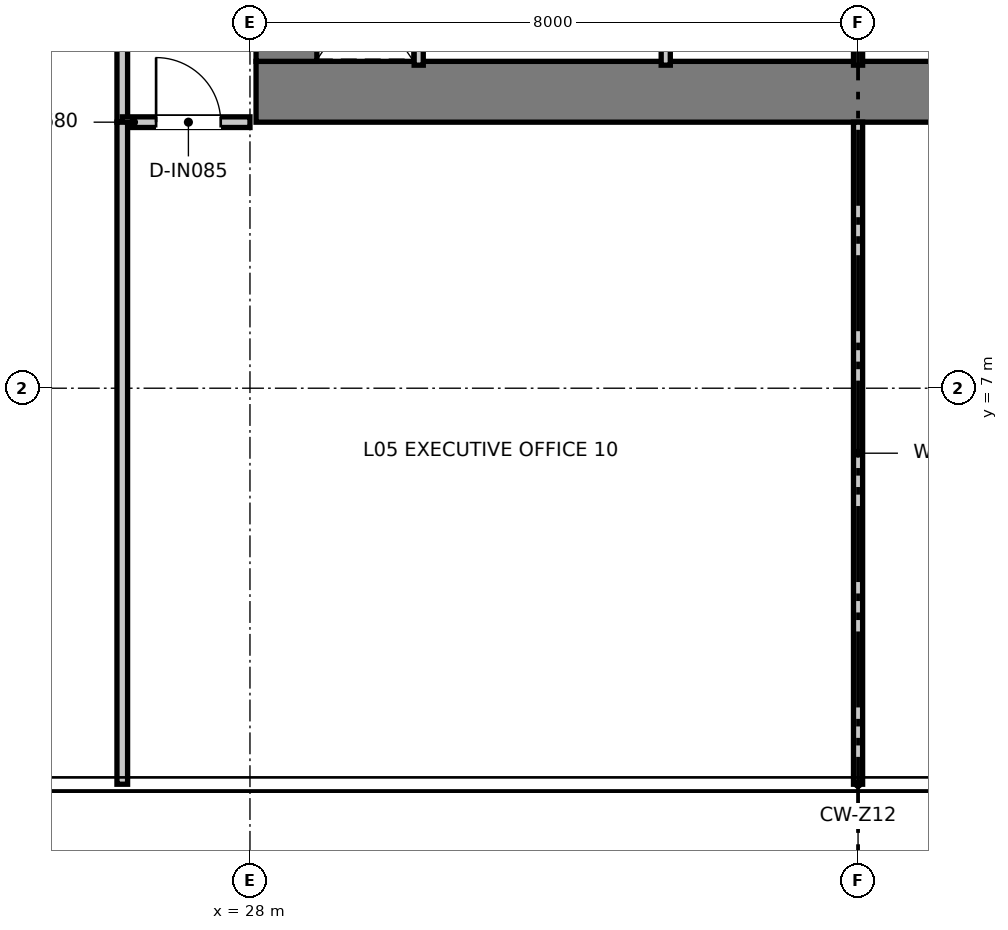
"""IFC4 building model, lengths in metres.
Left out: names, types, materials, properties, quantities, classifications, styles, units other than length and angle.
Written with IfcOpenShell. Run it as: python <this file> out.ifc"""

import sys

from ifc_helpers import new_model, si_unit, direction, frame, frame_2d, origin, place, context, subcontext, project, spatial, rectangle, extrude, element, fill, save


model = new_model("IFC4")
c1 = context("Model", 3, precision=1e-05, world=origin(), true_north=direction((0.0, 1.0)))
c2 = subcontext(c1, "Body", "Model", "MODEL_VIEW")
j1 = project(units=[si_unit("LENGTHUNIT", "METRE"), si_unit("PLANEANGLEUNIT", "RADIAN")], contexts=[c1])
p1 = place(None, origin())
s1 = spatial("IfcSite", under=j1, at=p1, CompositionType="ELEMENT")
p2 = place(p1, origin())
s2 = spatial("IfcBuilding", under=s1, at=p2, CompositionType="ELEMENT")
p3 = place(p2, frame((0.0, 0.0, 25.0)))
s3 = spatial("IfcBuildingStorey", under=s2, at=p3, CompositionType="ELEMENT", Elevation=25.0)
p4 = place(p3, frame((28.08, 10.9, 0.0), z_axis=(0.0, 0.0, 1.0), x_axis=(1.0, 0.0, 0.0)))
e1 = element("IfcWall", 1, at=p4, inside=s3, PredefinedType="SHEAR", context=c2, shape_type="SweptSolid", body=[
    extrude(rectangle(XDim=15.84, YDim=0.8, at=frame_2d((7.92, 0.0))), origin(), (0.0, 0.0, 1.0), 3.95),
])
p5 = place(p3, frame((28.48, 11.3, 0.0), z_axis=(0.0, 0.0, 1.0), x_axis=(0.0, 1.0, 0.0)))
e2 = element("IfcWall", 2, at=p5, inside=s3, PredefinedType="SHEAR", context=c2, shape_type="SweptSolid", body=[
    extrude(rectangle(XDim=14.7, YDim=0.8, at=frame_2d((7.35, 0.0))), origin(), (0.0, 0.0, 1.0), 3.95),
])
p6 = place(p3, frame((30.22, 11.25, 0.0), z_axis=(0.0, 0.0, 1.0), x_axis=(0.0, 1.0, 0.0)))
e3 = element("IfcWall", 3, at=p6, inside=s3, PredefinedType="PARTITIONING", context=c2, shape_type="SweptSolid", body=[
    extrude(rectangle(XDim=1.97, YDim=0.12, at=frame_2d((0.985, 0.0))), origin(), (0.0, 0.0, 1.0), 3.67),
])
for number, where, z_axis, x_axis in (
    (4, (33.47, 11.25, 0.0), (0.0, 0.0, 1.0), (0.0, 1.0, 0.0)),
    (5, (36.0, 11.25, 0.0), (0.0, 0.0, 1.0), (0.0, 1.0, 0.0)),
):
    element("IfcWall", number, at=place(p3, frame(where, z_axis=z_axis, x_axis=x_axis)), inside=s3, PredefinedType="PARTITIONING", context=c2, shape_type="SweptSolid", body=[
        extrude(rectangle(XDim=1.03, YDim=0.12, at=frame_2d((0.515, 0.0))), origin(), (0.0, 0.0, 1.0), 3.67),
    ])
p7 = place(p3, frame((26.32, 10.5, 0.0), z_axis=(0.0, 0.0, 1.0), x_axis=(0.0, 1.0, 0.0)))
e6 = element("IfcWall", 6, at=p7, inside=s3, PredefinedType="PARTITIONING", context=c2, shape_type="SweptSolid", body=[
    extrude(rectangle(XDim=25.62, YDim=0.14, at=frame_2d((12.81, 0.0))), origin(), (0.0, 0.0, 1.0), 2.97),
])
p8 = place(p7, frame((7.775, 0.0, 0.0)))
e7 = element("IfcOpeningElement", 7, at=p8, cuts=e6, PredefinedType="OPENING", context=c2, shape_type="SweptSolid", body=[
    extrude(rectangle(XDim=0.95, YDim=2.1, at=frame_2d((0.475, 1.05))), frame((0.0, 0.08, 0.0), z_axis=(0.0, -1.0, 0.0), x_axis=(1.0, 0.0, 0.0)), (0.0, 0.0, 1.0), 0.16),
])
p9 = place(p7, frame((12.425, 0.0, 0.0)))
e8 = element("IfcOpeningElement", 8, at=p9, cuts=e6, PredefinedType="OPENING", context=c2, shape_type="SweptSolid", body=[
    extrude(rectangle(XDim=0.95, YDim=2.1, at=frame_2d((0.475, 1.05))), frame((0.0, 0.08, 0.0), z_axis=(0.0, -1.0, 0.0), x_axis=(1.0, 0.0, 0.0)), (0.0, 0.0, 1.0), 0.16),
])
p10 = place(p7, frame((18.825, 0.0, 0.0)))
e9 = element("IfcOpeningElement", 9, at=p10, cuts=e6, PredefinedType="OPENING", context=c2, shape_type="SweptSolid", body=[
    extrude(rectangle(XDim=0.95, YDim=2.1, at=frame_2d((0.475, 1.05))), frame((0.0, 0.08, 0.0), z_axis=(0.0, -1.0, 0.0), x_axis=(1.0, 0.0, 0.0)), (0.0, 0.0, 1.0), 0.16),
])
p11 = place(p7, frame((22.775, 0.0, 0.0)))
e10 = element("IfcOpeningElement", 10, at=p11, cuts=e6, PredefinedType="OPENING", context=c2, shape_type="SweptSolid", body=[
    extrude(rectangle(XDim=0.95, YDim=2.1, at=frame_2d((0.475, 1.05))), frame((0.0, 0.08, 0.0), z_axis=(0.0, -1.0, 0.0), x_axis=(1.0, 0.0, 0.0)), (0.0, 0.0, 1.0), 0.16),
])
p12 = place(p3, frame((26.32, 10.5, 0.0), z_axis=(0.0, 0.0, 1.0), x_axis=(1.0, 0.0, 0.0)))
e11 = element("IfcWall", 11, at=p12, inside=s3, PredefinedType="PARTITIONING", context=c2, shape_type="SweptSolid", body=[
    extrude(rectangle(XDim=1.68, YDim=0.14, at=frame_2d((0.84, 0.0))), origin(), (0.0, 0.0, 1.0), 3.67),
])
p13 = place(p12, frame((0.445, 0.0, 0.0)))
e12 = element("IfcOpeningElement", 12, at=p13, cuts=e11, PredefinedType="OPENING", context=c2, shape_type="SweptSolid", body=[
    extrude(rectangle(XDim=0.85, YDim=2.1, at=frame_2d((0.425, 1.05))), frame((0.0, 0.08, 0.0), z_axis=(0.0, -1.0, 0.0), x_axis=(1.0, 0.0, 0.0)), (0.0, 0.0, 1.0), 0.16),
])
p14 = place(p3, frame((26.32, 1.79, 0.0), z_axis=(0.0, 0.0, 1.0), x_axis=(0.0, 1.0, 0.0)))
e13 = element("IfcWall", 13, at=p14, inside=s3, PredefinedType="PARTITIONING", context=c2, shape_type="SweptSolid", body=[
    extrude(rectangle(XDim=8.71, YDim=0.14, at=frame_2d((4.355, 0.0))), origin(), (0.0, 0.0, 1.0), 3.67),
])
p15 = place(p3, frame((36.0, 1.79, 0.0), z_axis=(0.0, 0.0, 1.0), x_axis=(0.0, 1.0, 0.0)))
e14 = element("IfcWall", 14, at=p15, inside=s3, PredefinedType="PARTITIONING", context=c2, shape_type="SweptSolid", body=[
    extrude(rectangle(XDim=8.71, YDim=0.12, at=frame_2d((4.355, 0.0))), origin(), (0.0, 0.0, 1.0), 3.67),
])
p16 = place(p13, origin())
e15 = element("IfcDoor", 15, at=p16, inside=s3, OperationType="SINGLE_SWING_LEFT", PredefinedType="DOOR", context=c2, shape_type="SweptSolid", body=[
    extrude(rectangle(XDim=0.85, YDim=2.1, at=frame_2d((0.425, 1.05))), frame((0.0, 0.025, 0.0), z_axis=(0.0, -1.0, 0.0), x_axis=(1.0, 0.0, 0.0)), (0.0, 0.0, 1.0), 0.05),
])
fill(e12, e15)
save(model, sys.argv[1])
